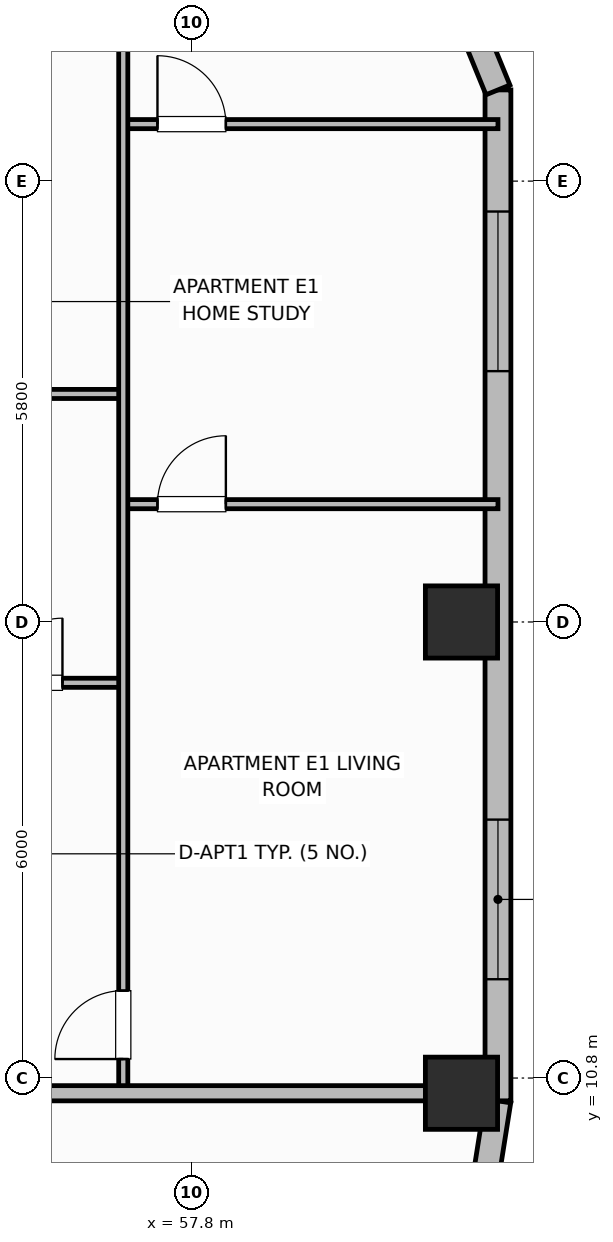
"""IFC4 building model, lengths in metres.
Left out: names, types, materials, properties, quantities, classifications, styles, units other than length and angle.
Written with IfcOpenShell. Run it as: python <this file> out.ifc"""

import sys

from ifc_helpers import new_model, si_unit, direction, frame, frame_2d, origin, origin_2d, place, context, subcontext, project, spatial, rectangle, extrude, element, fill, save


model = new_model("IFC4")
c1 = context("Model", 3, precision=1e-05, world=origin(), true_north=direction((0.0, 1.0)))
c2 = subcontext(c1, "Body", "Model", "MODEL_VIEW")
j1 = project(units=[si_unit("LENGTHUNIT", "METRE"), si_unit("PLANEANGLEUNIT", "RADIAN")], contexts=[c1])
p1 = place(None, origin())
s1 = spatial("IfcSite", under=j1, at=p1, CompositionType="ELEMENT")
p2 = place(p1, origin())
s2 = spatial("IfcBuilding", under=s1, at=p2, CompositionType="ELEMENT")
p3 = place(p2, frame((0.0, 0.0, 155.2)))
s3 = spatial("IfcBuildingStorey", under=s2, at=p3, CompositionType="ELEMENT", Elevation=155.2)
for number, where, z_axis, x_axis in (
    (1, (61.35, 10.6, 0.0), (0.0, 0.0, 1.0), (1.0, 0.0, 0.0)),
    (2, (61.35, 16.8, 0.0), (0.0, 0.0, 1.0), (1.0, 0.0, 0.0)),
):
    element("IfcColumn", number, at=place(p3, frame(where, z_axis=z_axis, x_axis=x_axis)), inside=s3, PredefinedType="COLUMN", context=c2, shape_type="SweptSolid", body=[
        extrude(rectangle(XDim=0.95, YDim=0.95, at=origin_2d()), origin(), (0.0, 0.0, 1.0), 3.7),
    ])
p4 = place(p3, frame((61.652, 9.378, 0.0), z_axis=(0.0, 0.0, 1.0), x_axis=(0.156514556949, 0.987675651954, 0.0)))
e3 = element("IfcWall", 3, at=p4, inside=s3, PredefinedType="SOLIDWALL", context=c2, shape_type="SweptSolid", body=[
    extrude(rectangle(XDim=1.135, YDim=0.34, at=frame_2d((0.568, 0.0))), origin(), (0.0, 0.0, 1.0), 2.72),
])
p5 = place(p3, frame((61.83, 10.5, 0.0), z_axis=(0.0, 0.0, 1.0), x_axis=(0.0, 1.0, 0.0)))
e4 = element("IfcWall", 4, at=p5, inside=s3, PredefinedType="SOLIDWALL", context=c2, shape_type="SweptSolid", body=[
    extrude(rectangle(XDim=13.3, YDim=0.34, at=frame_2d((6.65, 0.0))), origin(), (0.0, 0.0, 1.0), 2.72),
])
p6 = place(p5, frame((1.6, 0.0, 0.7)))
e5 = element("IfcOpeningElement", 5, at=p6, cuts=e4, PredefinedType="OPENING", context=c2, shape_type="SweptSolid", body=[
    extrude(rectangle(XDim=2.1, YDim=1.9, at=frame_2d((1.05, 0.95))), frame((0.0, 0.18, 0.0), z_axis=(0.0, -1.0, 0.0), x_axis=(1.0, 0.0, 0.0)), (0.0, 0.0, 1.0), 0.36),
])
p7 = place(p5, frame((9.6, 0.0, 0.7)))
e6 = element("IfcOpeningElement", 6, at=p7, cuts=e4, PredefinedType="OPENING", context=c2, shape_type="SweptSolid", body=[
    extrude(rectangle(XDim=2.1, YDim=1.9, at=frame_2d((1.05, 0.95))), frame((0.0, 0.18, 0.0), z_axis=(0.0, -1.0, 0.0), x_axis=(1.0, 0.0, 0.0)), (0.0, 0.0, 1.0), 0.36),
])
p8 = place(p3, frame((61.83, 23.8, 0.0), z_axis=(0.0, 0.0, 1.0), x_axis=(-0.378692835005, 0.925522412865, 0.0)))
e7 = element("IfcWall", 7, at=p8, inside=s3, PredefinedType="SOLIDWALL", context=c2, shape_type="SweptSolid", body=[
    extrude(rectangle(XDim=2.377, YDim=0.34, at=frame_2d((1.188, 0.0))), origin(), (0.0, 0.0, 1.0), 2.72),
])
p9 = place(p8, frame((0.638, 0.0, 0.91)))
e8 = element("IfcOpeningElement", 8, at=p9, cuts=e7, PredefinedType="OPENING", context=c2, shape_type="SweptSolid", body=[
    extrude(rectangle(XDim=1.1, YDim=1.65, at=frame_2d((0.55, 0.825))), frame((0.0, 0.18, 0.0), z_axis=(0.0, -1.0, 0.0), x_axis=(1.0, 0.0, 0.0)), (0.0, 0.0, 1.0), 0.36),
])
p10 = place(p3, frame((54.65, 16.0, 0.0), z_axis=(0.0, 0.0, 1.0), x_axis=(1.0, 0.0, 0.0)))
e9 = element("IfcWall", 9, at=p10, inside=s3, PredefinedType="PARTITIONING", context=c2, shape_type="SweptSolid", body=[
    extrude(rectangle(XDim=2.25, YDim=0.12, at=frame_2d((1.125, 0.0))), origin(), (0.0, 0.0, 1.0), 2.55),
])
p11 = place(p10, frame((0.6, 0.0, 0.0)))
e10 = element("IfcOpeningElement", 10, at=p11, cuts=e9, PredefinedType="OPENING", context=c2, shape_type="SweptSolid", body=[
    extrude(rectangle(XDim=0.85, YDim=2.1, at=frame_2d((0.425, 1.05))), frame((0.0, 0.07, 0.0), z_axis=(0.0, -1.0, 0.0), x_axis=(1.0, 0.0, 0.0)), (0.0, 0.0, 1.0), 0.14),
])
p12 = place(p3, frame((54.65, 19.8, 0.0), z_axis=(0.0, 0.0, 1.0), x_axis=(1.0, 0.0, 0.0)))
e11 = element("IfcWall", 11, at=p12, inside=s3, PredefinedType="PARTITIONING", context=c2, shape_type="SweptSolid", body=[
    extrude(rectangle(XDim=2.25, YDim=0.12, at=frame_2d((1.125, 0.0))), origin(), (0.0, 0.0, 1.0), 2.55),
])
p13 = place(p3, frame((56.9, 18.35, 0.0), z_axis=(0.0, 0.0, 1.0), x_axis=(1.0, 0.0, 0.0)))
e12 = element("IfcWall", 12, at=p13, inside=s3, PredefinedType="PARTITIONING", context=c2, shape_type="SweptSolid", body=[
    extrude(rectangle(XDim=4.93, YDim=0.12, at=frame_2d((2.465, 0.0))), origin(), (0.0, 0.0, 1.0), 2.55),
])
p14 = place(p13, frame((0.45, 0.0, 0.0)))
e13 = element("IfcOpeningElement", 13, at=p14, cuts=e12, PredefinedType="OPENING", context=c2, shape_type="SweptSolid", body=[
    extrude(rectangle(XDim=0.9, YDim=2.1, at=frame_2d((0.45, 1.05))), frame((0.0, 0.07, 0.0), z_axis=(0.0, -1.0, 0.0), x_axis=(1.0, 0.0, 0.0)), (0.0, 0.0, 1.0), 0.14),
])
p15 = place(p3, frame((56.9, 23.35, 0.0), z_axis=(0.0, 0.0, 1.0), x_axis=(1.0, 0.0, 0.0)))
e14 = element("IfcWall", 14, at=p15, inside=s3, PredefinedType="PARTITIONING", context=c2, shape_type="SweptSolid", body=[
    extrude(rectangle(XDim=4.93, YDim=0.12, at=frame_2d((2.465, 0.0))), origin(), (0.0, 0.0, 1.0), 2.55),
])
p16 = place(p15, frame((0.45, 0.0, 0.0)))
e15 = element("IfcOpeningElement", 15, at=p16, cuts=e14, PredefinedType="OPENING", context=c2, shape_type="SweptSolid", body=[
    extrude(rectangle(XDim=0.9, YDim=2.1, at=frame_2d((0.45, 1.05))), frame((0.0, 0.07, 0.0), z_axis=(0.0, -1.0, 0.0), x_axis=(1.0, 0.0, 0.0)), (0.0, 0.0, 1.0), 0.14),
])
p17 = place(p3, frame((56.9, 10.64, 0.0), z_axis=(0.0, 0.0, 1.0), x_axis=(0.0, 1.0, 0.0)))
e16 = element("IfcWall", 16, at=p17, inside=s3, PredefinedType="PARTITIONING", context=c2, shape_type="SweptSolid", body=[
    extrude(rectangle(XDim=19.12, YDim=0.12, at=frame_2d((9.56, 0.0))), origin(), (0.0, 0.0, 1.0), 2.55),
])
p18 = place(p17, frame((0.41, 0.0, 0.0)))
e17 = element("IfcOpeningElement", 17, at=p18, cuts=e16, PredefinedType="OPENING", context=c2, shape_type="SweptSolid", body=[
    extrude(rectangle(XDim=0.9, YDim=2.1, at=frame_2d((0.45, 1.05))), frame((0.0, 0.07, 0.0), z_axis=(0.0, -1.0, 0.0), x_axis=(1.0, 0.0, 0.0)), (0.0, 0.0, 1.0), 0.14),
])
p19 = place(p17, frame((13.735, 0.0, 0.0)))
e18 = element("IfcOpeningElement", 18, at=p19, cuts=e16, PredefinedType="OPENING", context=c2, shape_type="SweptSolid", body=[
    extrude(rectangle(XDim=0.82, YDim=2.08, at=frame_2d((0.41, 1.04))), frame((0.0, 0.07, 0.0), z_axis=(0.0, -1.0, 0.0), x_axis=(1.0, 0.0, 0.0)), (0.0, 0.0, 1.0), 0.14),
])
p20 = place(p3, frame((54.65, 10.6, 0.0), z_axis=(0.0, 0.0, 1.0), x_axis=(1.0, 0.0, 0.0)))
e19 = element("IfcWall", 19, at=p20, inside=s3, PredefinedType="PARTITIONING", context=c2, shape_type="SweptSolid", body=[
    extrude(rectangle(XDim=6.76, YDim=0.2, at=frame_2d((3.38, 0.0))), origin(), (0.0, 0.0, 1.0), 2.55),
])
p21 = place(p6, origin())
e20 = element("IfcWindow", 20, at=p21, inside=s3, PartitioningType="SINGLE_PANEL", PredefinedType="WINDOW", context=c2, shape_type="SweptSolid", body=[
    extrude(rectangle(XDim=2.1, YDim=1.9, at=frame_2d((1.05, 0.95))), frame((0.0, 0.03, 0.0), z_axis=(0.0, -1.0, 0.0), x_axis=(1.0, 0.0, 0.0)), (0.0, 0.0, 1.0), 0.06),
])
fill(e5, e20)
p22 = place(p7, origin())
e21 = element("IfcWindow", 21, at=p22, inside=s3, PartitioningType="SINGLE_PANEL", PredefinedType="WINDOW", context=c2, shape_type="SweptSolid", body=[
    extrude(rectangle(XDim=2.1, YDim=1.9, at=frame_2d((1.05, 0.95))), frame((0.0, 0.03, 0.0), z_axis=(0.0, -1.0, 0.0), x_axis=(1.0, 0.0, 0.0)), (0.0, 0.0, 1.0), 0.06),
])
fill(e6, e21)
p23 = place(p11, origin())
e22 = element("IfcDoor", 22, at=p23, inside=s3, OperationType="SINGLE_SWING_RIGHT", PredefinedType="DOOR", context=c2, shape_type="SweptSolid", body=[
    extrude(rectangle(XDim=0.85, YDim=2.1, at=frame_2d((0.425, 1.05))), frame((0.0, 0.025, 0.0), z_axis=(0.0, -1.0, 0.0), x_axis=(1.0, 0.0, 0.0)), (0.0, 0.0, 1.0), 0.05),
])
fill(e10, e22)
p24 = place(p14, origin())
e23 = element("IfcDoor", 23, at=p24, inside=s3, OperationType="SINGLE_SWING_RIGHT", PredefinedType="DOOR", context=c2, shape_type="SweptSolid", body=[
    extrude(rectangle(XDim=0.9, YDim=2.1, at=frame_2d((0.45, 1.05))), frame((0.0, 0.025, 0.0), z_axis=(0.0, -1.0, 0.0), x_axis=(1.0, 0.0, 0.0)), (0.0, 0.0, 1.0), 0.05),
])
fill(e13, e23)
p25 = place(p16, origin())
e24 = element("IfcDoor", 24, at=p25, inside=s3, OperationType="SINGLE_SWING_LEFT", PredefinedType="DOOR", context=c2, shape_type="SweptSolid", body=[
    extrude(rectangle(XDim=0.9, YDim=2.1, at=frame_2d((0.45, 1.05))), frame((0.0, 0.025, 0.0), z_axis=(0.0, -1.0, 0.0), x_axis=(1.0, 0.0, 0.0)), (0.0, 0.0, 1.0), 0.05),
])
fill(e15, e24)
p26 = place(p18, origin())
e25 = element("IfcDoor", 25, at=p26, inside=s3, OperationType="SINGLE_SWING_LEFT", PredefinedType="DOOR", context=c2, shape_type="SweptSolid", body=[
    extrude(rectangle(XDim=0.9, YDim=2.1, at=frame_2d((0.45, 1.05))), frame((0.0, 0.025, 0.0), z_axis=(0.0, -1.0, 0.0), x_axis=(1.0, 0.0, 0.0)), (0.0, 0.0, 1.0), 0.05),
])
fill(e17, e25)
save(model, sys.argv[1])
